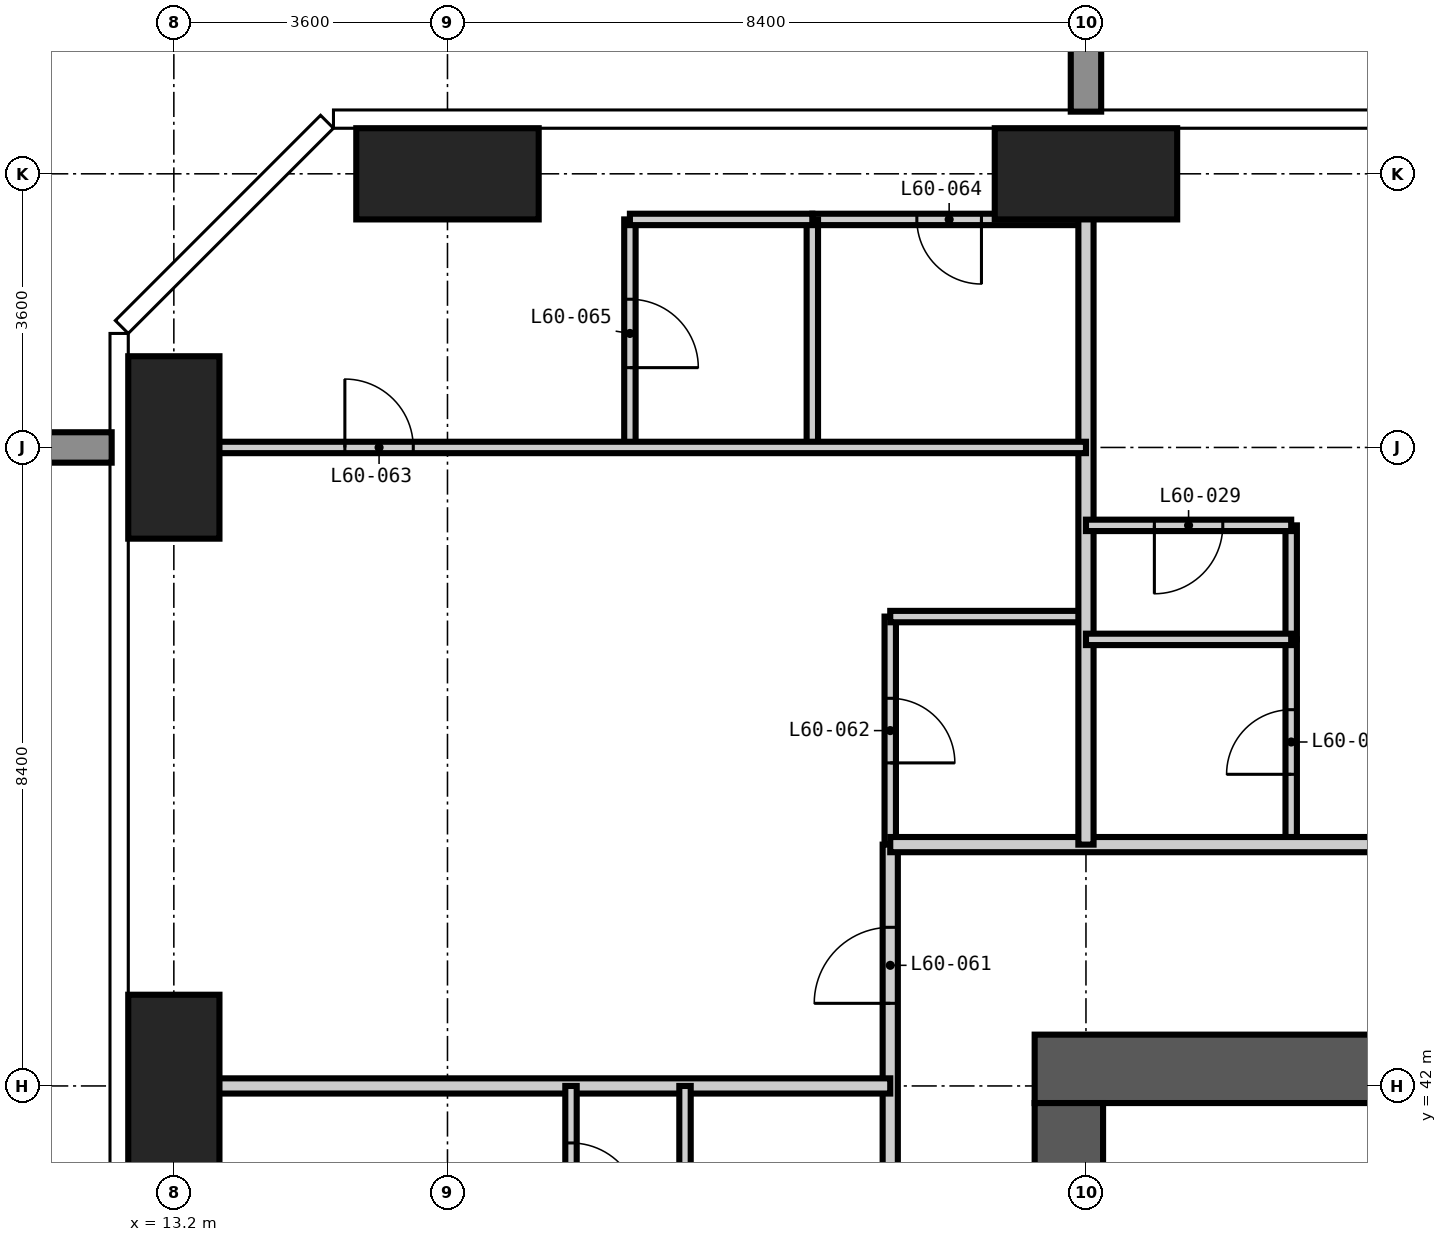
"""IFC4 building model, lengths in metres.
Left out: names, types, materials, properties, quantities, classifications, styles, units other than length and angle.
Written with IfcOpenShell. Run it as: python <this file> out.ifc"""

import sys

from ifc_helpers import new_model, si_unit, direction, frame, frame_2d, origin, origin_2d, place, context, subcontext, project, spatial, rectangle, extrude, element, fill, save


model = new_model("IFC4")
c1 = context("Model", 3, precision=1e-05, world=origin(), true_north=direction((0.0, 1.0)))
c2 = subcontext(c1, "Body", "Model", "MODEL_VIEW")
j1 = project(units=[si_unit("LENGTHUNIT", "METRE"), si_unit("PLANEANGLEUNIT", "RADIAN")], contexts=[c1])
p1 = place(None, origin())
s1 = spatial("IfcSite", under=j1, at=p1, CompositionType="ELEMENT")
p2 = place(p1, origin())
s2 = spatial("IfcBuilding", under=s1, at=p2, CompositionType="ELEMENT")
p3 = place(p2, frame((0.0, 0.0, 233.4)))
s3 = spatial("IfcBuildingStorey", under=s2, at=p3, CompositionType="ELEMENT", Elevation=233.4)
for number, where, z_axis, x_axis in (
    (1, (13.2, 42.0, -0.35), (0.0, 0.0, 1.0), (1.0, 0.0, 0.0)),
    (2, (13.2, 50.4, -0.35), (0.0, 0.0, 1.0), (1.0, 0.0, 0.0)),
):
    element("IfcColumn", number, at=place(p3, frame(where, z_axis=z_axis, x_axis=x_axis)), inside=s3, PredefinedType="COLUMN", context=c2, shape_type="SweptSolid", body=[
        extrude(rectangle(XDim=1.2, YDim=2.4, at=origin_2d()), origin(), (0.0, 0.0, 1.0), 3.9),
    ])
for number, where, z_axis, x_axis in (
    (3, (16.8, 54.0, -0.35), (0.0, 0.0, 1.0), (1.0, 0.0, 0.0)),
    (4, (25.2, 54.0, -0.35), (0.0, 0.0, 1.0), (1.0, 0.0, 0.0)),
):
    element("IfcColumn", number, at=place(p3, frame(where, z_axis=z_axis, x_axis=x_axis)), inside=s3, PredefinedType="COLUMN", context=c2, shape_type="SweptSolid", body=[
        extrude(rectangle(XDim=2.4, YDim=1.2, at=origin_2d()), origin(), (0.0, 0.0, 1.0), 3.9),
    ])
p4 = place(p3, frame((42.675, 42.225, -0.35), z_axis=(0.0, 0.0, 1.0), x_axis=(-1.0, 0.0, 0.0)))
e5 = element("IfcWall", 5, at=p4, inside=s3, PredefinedType="SHEAR", context=c2, shape_type="SweptSolid", body=[
    extrude(rectangle(XDim=18.15, YDim=0.9, at=frame_2d((9.075, 0.0))), origin(), (0.0, 0.0, 1.0), 3.9),
])
p5 = place(p4, frame((10.575, 0.0, 0.35)))
e6 = element("IfcOpeningElement", 6, at=p5, cuts=e5, PredefinedType="OPENING", context=c2, shape_type="SweptSolid", body=[
    extrude(rectangle(XDim=1.2, YDim=2.2, at=frame_2d((0.6, 1.1))), frame((0.0, 0.46, 0.0), z_axis=(0.0, -1.0, 0.0), x_axis=(1.0, 0.0, 0.0)), (0.0, 0.0, 1.0), 0.92),
])
p6 = place(p3, frame((24.975, 41.775, -0.35), z_axis=(0.0, 0.0, 1.0), x_axis=(0.0, -1.0, 0.0)))
e7 = element("IfcWall", 7, at=p6, inside=s3, PredefinedType="SHEAR", context=c2, shape_type="SweptSolid", body=[
    extrude(rectangle(XDim=24.75, YDim=0.9, at=frame_2d((12.375, 0.0))), origin(), (0.0, 0.0, 1.0), 3.9),
])
p7 = place(p6, frame((11.875, 0.0, 0.35)))
e8 = element("IfcOpeningElement", 8, at=p7, cuts=e7, PredefinedType="OPENING", context=c2, shape_type="SweptSolid", body=[
    extrude(rectangle(XDim=1.0, YDim=2.1, at=frame_2d((0.5, 1.05))), frame((0.0, 0.46, 0.0), z_axis=(0.0, -1.0, 0.0), x_axis=(1.0, 0.0, 0.0)), (0.0, 0.0, 1.0), 0.92),
])
p8 = place(p3, frame((22.625, 45.175, 0.0), z_axis=(0.0, 0.0, 1.0), x_axis=(0.0, 1.0, 0.0)))
e9 = element("IfcWall", 9, at=p8, inside=s3, PredefinedType="PARTITIONING", context=c2, shape_type="SweptSolid", body=[
    extrude(rectangle(XDim=3.0, YDim=0.15, at=frame_2d((1.5, 0.0))), origin(), (0.0, 0.0, 1.0), 3.55),
])
p9 = place(p8, frame((1.075, 0.0, 0.0)))
e10 = element("IfcOpeningElement", 10, at=p9, cuts=e9, PredefinedType="OPENING", context=c2, shape_type="SweptSolid", body=[
    extrude(rectangle(XDim=0.85, YDim=2.1, at=frame_2d((0.425, 1.05))), frame((0.0, 0.085, 0.0), z_axis=(0.0, -1.0, 0.0), x_axis=(1.0, 0.0, 0.0)), (0.0, 0.0, 1.0), 0.17),
])
p10 = place(p3, frame((27.9, 45.175, 0.0), z_axis=(0.0, 0.0, 1.0), x_axis=(0.0, 1.0, 0.0)))
e11 = element("IfcWall", 11, at=p10, inside=s3, PredefinedType="PARTITIONING", context=c2, shape_type="SweptSolid", body=[
    extrude(rectangle(XDim=2.7, YDim=0.15, at=frame_2d((1.35, 0.0))), origin(), (0.0, 0.0, 1.0), 3.55),
])
p11 = place(p10, frame((0.925, 0.0, 0.0)))
e12 = element("IfcOpeningElement", 12, at=p11, cuts=e11, PredefinedType="OPENING", context=c2, shape_type="SweptSolid", body=[
    extrude(rectangle(XDim=0.85, YDim=2.1, at=frame_2d((0.425, 1.05))), frame((0.0, 0.085, 0.0), z_axis=(0.0, -1.0, 0.0), x_axis=(1.0, 0.0, 0.0)), (0.0, 0.0, 1.0), 0.17),
])
p12 = place(p3, frame((22.625, 48.175, 0.0), z_axis=(0.0, 0.0, 1.0), x_axis=(1.0, 0.0, 0.0)))
e13 = element("IfcWall", 13, at=p12, inside=s3, PredefinedType="PARTITIONING", context=c2, shape_type="SweptSolid", body=[
    extrude(rectangle(XDim=2.575, YDim=0.15, at=frame_2d((1.288, 0.0))), origin(), (0.0, 0.0, 1.0), 3.55),
])
p13 = place(p3, frame((21.6, 53.4, 0.0), z_axis=(0.0, 0.0, 1.0), x_axis=(1.0, 0.0, 0.0)))
e14 = element("IfcWall", 14, at=p13, inside=s3, PredefinedType="PARTITIONING", context=c2, shape_type="SweptSolid", body=[
    extrude(rectangle(XDim=3.6, YDim=0.15, at=frame_2d((1.8, 0.0))), origin(), (0.0, 0.0, 1.0), 3.55),
])
p14 = place(p13, frame((1.375, 0.0, 0.0)))
e15 = element("IfcOpeningElement", 15, at=p14, cuts=e14, PredefinedType="OPENING", context=c2, shape_type="SweptSolid", body=[
    extrude(rectangle(XDim=0.85, YDim=2.1, at=frame_2d((0.425, 1.05))), frame((0.0, 0.085, 0.0), z_axis=(0.0, -1.0, 0.0), x_axis=(1.0, 0.0, 0.0)), (0.0, 0.0, 1.0), 0.17),
])
p15 = place(p3, frame((22.625, 14.225, 0.0), z_axis=(0.0, 0.0, 1.0), x_axis=(0.0, 1.0, 0.0)))
e16 = element("IfcWall", 16, at=p15, inside=s3, PredefinedType="PARTITIONING", context=c2, shape_type="SweptSolid", body=[
    extrude(rectangle(XDim=30.95, YDim=0.2, at=frame_2d((15.475, 0.0))), origin(), (0.0, 0.0, 1.0), 3.55),
])
p16 = place(p15, frame((5.075, 0.0, 0.0)))
e17 = element("IfcOpeningElement", 17, at=p16, cuts=e16, PredefinedType="OPENING", context=c2, shape_type="SweptSolid", body=[
    extrude(rectangle(XDim=1.0, YDim=2.2, at=frame_2d((0.5, 1.1))), frame((0.0, 0.11, 0.0), z_axis=(0.0, -1.0, 0.0), x_axis=(1.0, 0.0, 0.0)), (0.0, 0.0, 1.0), 0.22),
])
p17 = place(p15, frame((13.475, 0.0, 0.0)))
e18 = element("IfcOpeningElement", 18, at=p17, cuts=e16, PredefinedType="OPENING", context=c2, shape_type="SweptSolid", body=[
    extrude(rectangle(XDim=1.0, YDim=2.2, at=frame_2d((0.5, 1.1))), frame((0.0, 0.11, 0.0), z_axis=(0.0, -1.0, 0.0), x_axis=(1.0, 0.0, 0.0)), (0.0, 0.0, 1.0), 0.22),
])
p18 = place(p15, frame((21.875, 0.0, 0.0)))
e19 = element("IfcOpeningElement", 19, at=p18, cuts=e16, PredefinedType="OPENING", context=c2, shape_type="SweptSolid", body=[
    extrude(rectangle(XDim=1.0, YDim=2.2, at=frame_2d((0.5, 1.1))), frame((0.0, 0.11, 0.0), z_axis=(0.0, -1.0, 0.0), x_axis=(1.0, 0.0, 0.0)), (0.0, 0.0, 1.0), 0.22),
])
p19 = place(p15, frame((0.787, 0.0, 0.0)))
e20 = element("IfcOpeningElement", 20, at=p19, cuts=e16, PredefinedType="OPENING", context=c2, shape_type="SweptSolid", body=[
    extrude(rectangle(XDim=1.0, YDim=2.2, at=frame_2d((0.5, 1.1))), frame((0.0, 0.11, 0.0), z_axis=(0.0, -1.0, 0.0), x_axis=(1.0, 0.0, 0.0)), (0.0, 0.0, 1.0), 0.22),
])
p20 = place(p15, frame((28.862, 0.0, 0.0)))
e21 = element("IfcOpeningElement", 21, at=p20, cuts=e16, PredefinedType="OPENING", context=c2, shape_type="SweptSolid", body=[
    extrude(rectangle(XDim=1.0, YDim=2.2, at=frame_2d((0.5, 1.1))), frame((0.0, 0.11, 0.0), z_axis=(0.0, -1.0, 0.0), x_axis=(1.0, 0.0, 0.0)), (0.0, 0.0, 1.0), 0.22),
])
p21 = place(p3, frame((22.625, 45.175, 0.0), z_axis=(0.0, 0.0, 1.0), x_axis=(1.0, 0.0, 0.0)))
e22 = element("IfcWall", 22, at=p21, inside=s3, PredefinedType="PARTITIONING", context=c2, shape_type="SweptSolid", body=[
    extrude(rectangle(XDim=22.25, YDim=0.2, at=frame_2d((11.125, 0.0))), origin(), (0.0, 0.0, 1.0), 3.55),
])
p22 = place(p21, frame((7.625, 0.0, 0.0)))
e23 = element("IfcOpeningElement", 23, at=p22, cuts=e22, PredefinedType="OPENING", context=c2, shape_type="SweptSolid", body=[
    extrude(rectangle(XDim=1.0, YDim=2.2, at=frame_2d((0.5, 1.1))), frame((0.0, 0.11, 0.0), z_axis=(0.0, -1.0, 0.0), x_axis=(1.0, 0.0, 0.0)), (0.0, 0.0, 1.0), 0.22),
])
p23 = place(p21, frame((16.025, 0.0, 0.0)))
e24 = element("IfcOpeningElement", 24, at=p23, cuts=e22, PredefinedType="OPENING", context=c2, shape_type="SweptSolid", body=[
    extrude(rectangle(XDim=1.0, YDim=2.2, at=frame_2d((0.5, 1.1))), frame((0.0, 0.11, 0.0), z_axis=(0.0, -1.0, 0.0), x_axis=(1.0, 0.0, 0.0)), (0.0, 0.0, 1.0), 0.22),
])
p24 = place(p3, frame((25.2, 45.175, 0.0), z_axis=(0.0, 0.0, 1.0), x_axis=(0.0, 1.0, 0.0)))
e25 = element("IfcWall", 25, at=p24, inside=s3, PredefinedType="PARTITIONING", context=c2, shape_type="SweptSolid", body=[
    extrude(rectangle(XDim=9.443, YDim=0.2, at=frame_2d((4.721, 0.0))), origin(), (0.0, 0.0, 1.0), 3.55),
])
p25 = place(p3, frame((12.582, 42.0, 0.0), z_axis=(0.0, 0.0, 1.0), x_axis=(1.0, 0.0, 0.0)))
e26 = element("IfcWall", 26, at=p25, inside=s3, PredefinedType="PARTITIONING", context=c2, shape_type="SweptSolid", body=[
    extrude(rectangle(XDim=10.043, YDim=0.2, at=frame_2d((5.021, 0.0))), origin(), (0.0, 0.0, 1.0), 3.55),
])
p26 = place(p3, frame((18.425, 39.6, 0.0), z_axis=(0.0, 0.0, 1.0), x_axis=(0.0, 1.0, 0.0)))
e27 = element("IfcWall", 27, at=p26, inside=s3, PredefinedType="PARTITIONING", context=c2, shape_type="SweptSolid", body=[
    extrude(rectangle(XDim=2.4, YDim=0.15, at=frame_2d((1.2, 0.0))), origin(), (0.0, 0.0, 1.0), 3.55),
])
p27 = place(p26, frame((0.75, 0.0, 0.0)))
e28 = element("IfcOpeningElement", 28, at=p27, cuts=e27, PredefinedType="OPENING", context=c2, shape_type="SweptSolid", body=[
    extrude(rectangle(XDim=0.9, YDim=2.1, at=frame_2d((0.45, 1.05))), frame((0.0, 0.085, 0.0), z_axis=(0.0, -1.0, 0.0), x_axis=(1.0, 0.0, 0.0)), (0.0, 0.0, 1.0), 0.17),
])
p28 = place(p3, frame((19.2, 50.4, 0.0), z_axis=(0.0, 0.0, 1.0), x_axis=(0.0, 1.0, 0.0)))
e29 = element("IfcWall", 29, at=p28, inside=s3, PredefinedType="PARTITIONING", context=c2, shape_type="SweptSolid", body=[
    extrude(rectangle(XDim=3.0, YDim=0.15, at=frame_2d((1.5, 0.0))), origin(), (0.0, 0.0, 1.0), 3.55),
])
p29 = place(p28, frame((1.05, 0.0, 0.0)))
e30 = element("IfcOpeningElement", 30, at=p29, cuts=e29, PredefinedType="OPENING", context=c2, shape_type="SweptSolid", body=[
    extrude(rectangle(XDim=0.9, YDim=2.1, at=frame_2d((0.45, 1.05))), frame((0.0, 0.085, 0.0), z_axis=(0.0, -1.0, 0.0), x_axis=(1.0, 0.0, 0.0)), (0.0, 0.0, 1.0), 0.17),
])
p30 = place(p3, frame((19.925, 39.6, 0.0), z_axis=(0.0, 0.0, 1.0), x_axis=(0.0, 1.0, 0.0)))
e31 = element("IfcWall", 31, at=p30, inside=s3, PredefinedType="PARTITIONING", context=c2, shape_type="SweptSolid", body=[
    extrude(rectangle(XDim=2.4, YDim=0.15, at=frame_2d((1.2, 0.0))), origin(), (0.0, 0.0, 1.0), 3.55),
])
p31 = place(p3, frame((21.6, 50.4, 0.0), z_axis=(0.0, 0.0, 1.0), x_axis=(0.0, 1.0, 0.0)))
e32 = element("IfcWall", 32, at=p31, inside=s3, PredefinedType="PARTITIONING", context=c2, shape_type="SweptSolid", body=[
    extrude(rectangle(XDim=3.0, YDim=0.15, at=frame_2d((1.5, 0.0))), origin(), (0.0, 0.0, 1.0), 3.55),
])
p32 = place(p3, frame((27.9, 47.875, 0.0), z_axis=(0.0, 0.0, 1.0), x_axis=(0.0, 1.0, 0.0)))
e33 = element("IfcWall", 33, at=p32, inside=s3, PredefinedType="PARTITIONING", context=c2, shape_type="SweptSolid", body=[
    extrude(rectangle(XDim=1.5, YDim=0.15, at=frame_2d((0.75, 0.0))), origin(), (0.0, 0.0, 1.0), 3.55),
])
p33 = place(p3, frame((25.2, 47.875, 0.0), z_axis=(0.0, 0.0, 1.0), x_axis=(1.0, 0.0, 0.0)))
e34 = element("IfcWall", 34, at=p33, inside=s3, PredefinedType="PARTITIONING", context=c2, shape_type="SweptSolid", body=[
    extrude(rectangle(XDim=2.7, YDim=0.15, at=frame_2d((1.35, 0.0))), origin(), (0.0, 0.0, 1.0), 3.55),
])
p34 = place(p3, frame((25.2, 49.375, 0.0), z_axis=(0.0, 0.0, 1.0), x_axis=(1.0, 0.0, 0.0)))
e35 = element("IfcWall", 35, at=p34, inside=s3, PredefinedType="PARTITIONING", context=c2, shape_type="SweptSolid", body=[
    extrude(rectangle(XDim=2.7, YDim=0.15, at=frame_2d((1.35, 0.0))), origin(), (0.0, 0.0, 1.0), 3.55),
])
p35 = place(p34, frame((0.9, 0.0, 0.0)))
e36 = element("IfcOpeningElement", 36, at=p35, cuts=e35, PredefinedType="OPENING", context=c2, shape_type="SweptSolid", body=[
    extrude(rectangle(XDim=0.9, YDim=2.1, at=frame_2d((0.45, 1.05))), frame((0.0, 0.085, 0.0), z_axis=(0.0, -1.0, 0.0), x_axis=(1.0, 0.0, 0.0)), (0.0, 0.0, 1.0), 0.17),
])
p36 = place(p3, frame((12.582, 50.4, 0.0), z_axis=(0.0, 0.0, 1.0), x_axis=(1.0, 0.0, 0.0)))
e37 = element("IfcWall", 37, at=p36, inside=s3, PredefinedType="PARTITIONING", context=c2, shape_type="SweptSolid", body=[
    extrude(rectangle(XDim=12.618, YDim=0.15, at=frame_2d((6.309, 0.0))), origin(), (0.0, 0.0, 1.0), 3.55),
])
p37 = place(p36, frame((2.868, 0.0, 0.0)))
e38 = element("IfcOpeningElement", 38, at=p37, cuts=e37, PredefinedType="OPENING", context=c2, shape_type="SweptSolid", body=[
    extrude(rectangle(XDim=0.9, YDim=2.1, at=frame_2d((0.45, 1.05))), frame((0.0, 0.085, 0.0), z_axis=(0.0, -1.0, 0.0), x_axis=(1.0, 0.0, 0.0)), (0.0, 0.0, 1.0), 0.17),
])
p38 = place(p3, frame((19.2, 53.4, 0.0), z_axis=(0.0, 0.0, 1.0), x_axis=(1.0, 0.0, 0.0)))
e39 = element("IfcWall", 39, at=p38, inside=s3, PredefinedType="PARTITIONING", context=c2, shape_type="SweptSolid", body=[
    extrude(rectangle(XDim=2.4, YDim=0.15, at=frame_2d((1.2, 0.0))), origin(), (0.0, 0.0, 1.0), 3.55),
])
p39 = place(p11, origin())
e40 = element("IfcDoor", 40, at=p39, inside=s3, OperationType="SINGLE_SWING_LEFT", PredefinedType="DOOR", context=c2, shape_type="SweptSolid", body=[
    extrude(rectangle(XDim=0.85, YDim=2.1, at=frame_2d((0.425, 1.05))), frame((0.0, 0.025, 0.0), z_axis=(0.0, -1.0, 0.0), x_axis=(1.0, 0.0, 0.0)), (0.0, 0.0, 1.0), 0.05),
])
fill(e12, e40)
p40 = place(p35, frame((0.9, 0.0, 0.0), z_axis=(0.0, 0.0, 1.0), x_axis=(-1.0, 0.0, 0.0)))
e41 = element("IfcDoor", 41, at=p40, inside=s3, OperationType="SINGLE_SWING_RIGHT", PredefinedType="DOOR", context=c2, shape_type="SweptSolid", body=[
    extrude(rectangle(XDim=0.9, YDim=2.1, at=frame_2d((0.45, 1.05))), frame((0.0, 0.025, 0.0), z_axis=(0.0, -1.0, 0.0), x_axis=(1.0, 0.0, 0.0)), (0.0, 0.0, 1.0), 0.05),
])
fill(e36, e41)
p41 = place(p27, frame((0.9, 0.0, 0.0), z_axis=(0.0, 0.0, 1.0), x_axis=(-1.0, 0.0, 0.0)))
e42 = element("IfcDoor", 42, at=p41, inside=s3, OperationType="SINGLE_SWING_RIGHT", PredefinedType="DOOR", context=c2, shape_type="SweptSolid", body=[
    extrude(rectangle(XDim=0.9, YDim=2.1, at=frame_2d((0.45, 1.05))), frame((0.0, 0.025, 0.0), z_axis=(0.0, -1.0, 0.0), x_axis=(1.0, 0.0, 0.0)), (0.0, 0.0, 1.0), 0.05),
])
fill(e28, e42)
p42 = place(p20, origin())
e43 = element("IfcDoor", 43, at=p42, inside=s3, OperationType="SINGLE_SWING_LEFT", PredefinedType="DOOR", context=c2, shape_type="SweptSolid", body=[
    extrude(rectangle(XDim=1.0, YDim=2.2, at=frame_2d((0.5, 1.1))), frame((0.0, 0.025, 0.0), z_axis=(0.0, -1.0, 0.0), x_axis=(1.0, 0.0, 0.0)), (0.0, 0.0, 1.0), 0.05),
])
fill(e21, e43)
p43 = place(p9, frame((0.85, 0.0, 0.0), z_axis=(0.0, 0.0, 1.0), x_axis=(-1.0, 0.0, 0.0)))
e44 = element("IfcDoor", 44, at=p43, inside=s3, OperationType="SINGLE_SWING_RIGHT", PredefinedType="DOOR", context=c2, shape_type="SweptSolid", body=[
    extrude(rectangle(XDim=0.85, YDim=2.1, at=frame_2d((0.425, 1.05))), frame((0.0, 0.025, 0.0), z_axis=(0.0, -1.0, 0.0), x_axis=(1.0, 0.0, 0.0)), (0.0, 0.0, 1.0), 0.05),
])
fill(e10, e44)
p44 = place(p37, origin())
e45 = element("IfcDoor", 45, at=p44, inside=s3, OperationType="SINGLE_SWING_LEFT", PredefinedType="DOOR", context=c2, shape_type="SweptSolid", body=[
    extrude(rectangle(XDim=0.9, YDim=2.1, at=frame_2d((0.45, 1.05))), frame((0.0, 0.025, 0.0), z_axis=(0.0, -1.0, 0.0), x_axis=(1.0, 0.0, 0.0)), (0.0, 0.0, 1.0), 0.05),
])
fill(e38, e45)
p45 = place(p14, frame((0.85, 0.0, 0.0), z_axis=(0.0, 0.0, 1.0), x_axis=(-1.0, 0.0, 0.0)))
e46 = element("IfcDoor", 46, at=p45, inside=s3, OperationType="SINGLE_SWING_LEFT", PredefinedType="DOOR", context=c2, shape_type="SweptSolid", body=[
    extrude(rectangle(XDim=0.85, YDim=2.1, at=frame_2d((0.425, 1.05))), frame((0.0, 0.025, 0.0), z_axis=(0.0, -1.0, 0.0), x_axis=(1.0, 0.0, 0.0)), (0.0, 0.0, 1.0), 0.05),
])
fill(e15, e46)
p46 = place(p29, frame((0.9, 0.0, 0.0), z_axis=(0.0, 0.0, 1.0), x_axis=(-1.0, 0.0, 0.0)))
e47 = element("IfcDoor", 47, at=p46, inside=s3, OperationType="SINGLE_SWING_RIGHT", PredefinedType="DOOR", context=c2, shape_type="SweptSolid", body=[
    extrude(rectangle(XDim=0.9, YDim=2.1, at=frame_2d((0.45, 1.05))), frame((0.0, 0.025, 0.0), z_axis=(0.0, -1.0, 0.0), x_axis=(1.0, 0.0, 0.0)), (0.0, 0.0, 1.0), 0.05),
])
fill(e30, e47)
save(model, sys.argv[1])
